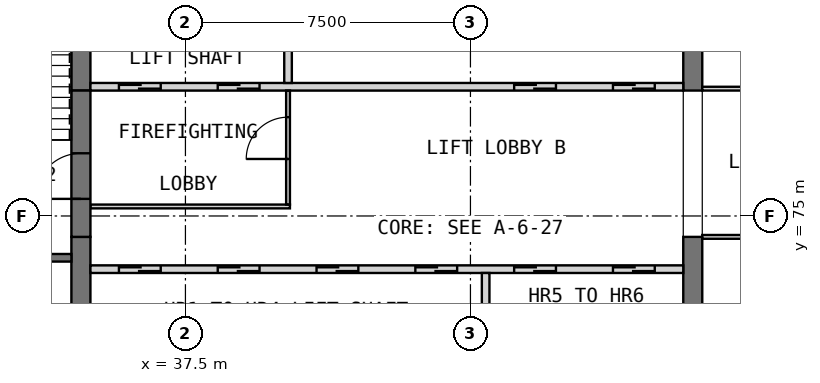
"""IFC4 building model, lengths in metres.
Left out: names, types, materials, properties, quantities, classifications, styles, units other than length and angle.
Written with IfcOpenShell. Run it as: python <this file> out.ifc"""

import sys

from ifc_helpers import new_model, si_unit, direction, frame, frame_2d, origin, place, context, subcontext, project, spatial, rectangle, extrude, element, fill, save


model = new_model("IFC4")
c1 = context("Model", 3, precision=1e-05, world=origin(), true_north=direction((0.0, 1.0)))
c2 = subcontext(c1, "Body", "Model", "MODEL_VIEW")
j1 = project(units=[si_unit("LENGTHUNIT", "METRE"), si_unit("PLANEANGLEUNIT", "RADIAN")], contexts=[c1])
p1 = place(None, origin())
s1 = spatial("IfcSite", under=j1, at=p1, CompositionType="ELEMENT")
p2 = place(p1, origin())
s2 = spatial("IfcBuilding", under=s1, at=p2, CompositionType="ELEMENT")
p3 = place(p2, frame((0.0, 0.0, 189.7)))
s3 = spatial("IfcBuildingStorey", under=s2, at=p3, CompositionType="ELEMENT", Elevation=189.7)
p4 = place(p3, frame((34.75, 68.05, 0.0), z_axis=(0.0, 0.0, 1.0), x_axis=(0.0, 1.0, 0.0)))
e1 = element("IfcWall", 1, at=p4, inside=s3, PredefinedType="SHEAR", context=c2, shape_type="SweptSolid", body=[
    extrude(rectangle(XDim=6.4, YDim=0.5, at=frame_2d((3.2, 0.0))), origin(), (0.0, 0.0, 1.0), 3.5),
])
p5 = place(p3, frame((34.75, 78.3, 0.0), z_axis=(0.0, 0.0, 1.0), x_axis=(0.0, 1.0, 0.0)))
e2 = element("IfcWall", 2, at=p5, inside=s3, PredefinedType="SHEAR", context=c2, shape_type="SweptSolid", body=[
    extrude(rectangle(XDim=3.4, YDim=0.5, at=frame_2d((1.7, 0.0))), origin(), (0.0, 0.0, 1.0), 3.5),
])
p6 = place(p3, frame((50.85, 68.05, 0.0), z_axis=(0.0, 0.0, 1.0), x_axis=(0.0, 1.0, 0.0)))
e3 = element("IfcWall", 3, at=p6, inside=s3, PredefinedType="SHEAR", context=c2, shape_type="SweptSolid", body=[
    extrude(rectangle(XDim=6.4, YDim=0.5, at=frame_2d((3.2, 0.0))), origin(), (0.0, 0.0, 1.0), 3.5),
])
p7 = place(p3, frame((50.85, 78.3, 0.0), z_axis=(0.0, 0.0, 1.0), x_axis=(0.0, 1.0, 0.0)))
e4 = element("IfcWall", 4, at=p7, inside=s3, PredefinedType="SHEAR", context=c2, shape_type="SweptSolid", body=[
    extrude(rectangle(XDim=3.4, YDim=0.5, at=frame_2d((1.7, 0.0))), origin(), (0.0, 0.0, 1.0), 3.5),
])
p8 = place(p3, frame((35.0, 73.6, 0.0), z_axis=(0.0, 0.0, 1.0), x_axis=(1.0, 0.0, 0.0)))
e5 = element("IfcWall", 5, at=p8, inside=s3, PredefinedType="SOLIDWALL", context=c2, shape_type="SweptSolid", body=[
    extrude(rectangle(XDim=15.6, YDim=0.2, at=frame_2d((7.8, 0.0))), origin(), (0.0, 0.0, 1.0), 3.5),
])
p9 = place(p8, frame((0.75, 0.0, 0.0)))
e6 = element("IfcOpeningElement", 6, at=p9, cuts=e5, PredefinedType="OPENING", context=c2, shape_type="SweptSolid", body=[
    extrude(rectangle(XDim=1.1, YDim=2.1, at=frame_2d((0.55, 1.05))), frame((0.0, 0.11, 0.0), z_axis=(0.0, -1.0, 0.0), x_axis=(1.0, 0.0, 0.0)), (0.0, 0.0, 1.0), 0.22),
])
p10 = place(p8, frame((3.35, 0.0, 0.0)))
e7 = element("IfcOpeningElement", 7, at=p10, cuts=e5, PredefinedType="OPENING", context=c2, shape_type="SweptSolid", body=[
    extrude(rectangle(XDim=1.1, YDim=2.1, at=frame_2d((0.55, 1.05))), frame((0.0, 0.11, 0.0), z_axis=(0.0, -1.0, 0.0), x_axis=(1.0, 0.0, 0.0)), (0.0, 0.0, 1.0), 0.22),
])
p11 = place(p8, frame((5.95, 0.0, 0.0)))
e8 = element("IfcOpeningElement", 8, at=p11, cuts=e5, PredefinedType="OPENING", context=c2, shape_type="SweptSolid", body=[
    extrude(rectangle(XDim=1.1, YDim=2.1, at=frame_2d((0.55, 1.05))), frame((0.0, 0.11, 0.0), z_axis=(0.0, -1.0, 0.0), x_axis=(1.0, 0.0, 0.0)), (0.0, 0.0, 1.0), 0.22),
])
p12 = place(p8, frame((8.55, 0.0, 0.0)))
e9 = element("IfcOpeningElement", 9, at=p12, cuts=e5, PredefinedType="OPENING", context=c2, shape_type="SweptSolid", body=[
    extrude(rectangle(XDim=1.1, YDim=2.1, at=frame_2d((0.55, 1.05))), frame((0.0, 0.11, 0.0), z_axis=(0.0, -1.0, 0.0), x_axis=(1.0, 0.0, 0.0)), (0.0, 0.0, 1.0), 0.22),
])
p13 = place(p8, frame((11.15, 0.0, 0.0)))
e10 = element("IfcOpeningElement", 10, at=p13, cuts=e5, PredefinedType="OPENING", context=c2, shape_type="SweptSolid", body=[
    extrude(rectangle(XDim=1.1, YDim=2.1, at=frame_2d((0.55, 1.05))), frame((0.0, 0.11, 0.0), z_axis=(0.0, -1.0, 0.0), x_axis=(1.0, 0.0, 0.0)), (0.0, 0.0, 1.0), 0.22),
])
p14 = place(p8, frame((13.75, 0.0, 0.0)))
e11 = element("IfcOpeningElement", 11, at=p14, cuts=e5, PredefinedType="OPENING", context=c2, shape_type="SweptSolid", body=[
    extrude(rectangle(XDim=1.1, YDim=2.1, at=frame_2d((0.55, 1.05))), frame((0.0, 0.11, 0.0), z_axis=(0.0, -1.0, 0.0), x_axis=(1.0, 0.0, 0.0)), (0.0, 0.0, 1.0), 0.22),
])
p15 = place(p3, frame((45.4, 71.5, 0.0), z_axis=(0.0, 0.0, 1.0), x_axis=(0.0, 1.0, 0.0)))
e12 = element("IfcWall", 12, at=p15, inside=s3, PredefinedType="SOLIDWALL", context=c2, shape_type="SweptSolid", body=[
    extrude(rectangle(XDim=2.0, YDim=0.2, at=frame_2d((1.0, 0.0))), origin(), (0.0, 0.0, 1.0), 3.5),
])
p16 = place(p3, frame((35.0, 78.4, 0.0), z_axis=(0.0, 0.0, 1.0), x_axis=(1.0, 0.0, 0.0)))
e13 = element("IfcWall", 13, at=p16, inside=s3, PredefinedType="SOLIDWALL", context=c2, shape_type="SweptSolid", body=[
    extrude(rectangle(XDim=15.6, YDim=0.2, at=frame_2d((7.8, 0.0))), origin(), (0.0, 0.0, 1.0), 3.5),
])
p17 = place(p16, frame((0.75, 0.0, 0.0)))
e14 = element("IfcOpeningElement", 14, at=p17, cuts=e13, PredefinedType="OPENING", context=c2, shape_type="SweptSolid", body=[
    extrude(rectangle(XDim=1.1, YDim=2.1, at=frame_2d((0.55, 1.05))), frame((0.0, 0.11, 0.0), z_axis=(0.0, -1.0, 0.0), x_axis=(1.0, 0.0, 0.0)), (0.0, 0.0, 1.0), 0.22),
])
p18 = place(p16, frame((3.35, 0.0, 0.0)))
e15 = element("IfcOpeningElement", 15, at=p18, cuts=e13, PredefinedType="OPENING", context=c2, shape_type="SweptSolid", body=[
    extrude(rectangle(XDim=1.1, YDim=2.1, at=frame_2d((0.55, 1.05))), frame((0.0, 0.11, 0.0), z_axis=(0.0, -1.0, 0.0), x_axis=(1.0, 0.0, 0.0)), (0.0, 0.0, 1.0), 0.22),
])
p19 = place(p16, frame((11.15, 0.0, 0.0)))
e16 = element("IfcOpeningElement", 16, at=p19, cuts=e13, PredefinedType="OPENING", context=c2, shape_type="SweptSolid", body=[
    extrude(rectangle(XDim=1.1, YDim=2.1, at=frame_2d((0.55, 1.05))), frame((0.0, 0.11, 0.0), z_axis=(0.0, -1.0, 0.0), x_axis=(1.0, 0.0, 0.0)), (0.0, 0.0, 1.0), 0.22),
])
p20 = place(p16, frame((13.75, 0.0, 0.0)))
e17 = element("IfcOpeningElement", 17, at=p20, cuts=e13, PredefinedType="OPENING", context=c2, shape_type="SweptSolid", body=[
    extrude(rectangle(XDim=1.1, YDim=2.1, at=frame_2d((0.55, 1.05))), frame((0.0, 0.11, 0.0), z_axis=(0.0, -1.0, 0.0), x_axis=(1.0, 0.0, 0.0)), (0.0, 0.0, 1.0), 0.22),
])
p21 = place(p3, frame((40.2, 78.5, 0.0), z_axis=(0.0, 0.0, 1.0), x_axis=(0.0, 1.0, 0.0)))
e18 = element("IfcWall", 18, at=p21, inside=s3, PredefinedType="SOLIDWALL", context=c2, shape_type="SweptSolid", body=[
    extrude(rectangle(XDim=3.2, YDim=0.2, at=frame_2d((1.6, 0.0))), origin(), (0.0, 0.0, 1.0), 3.5),
])
p22 = place(p3, frame((35.0, 75.25, 0.0), z_axis=(0.0, 0.0, 1.0), x_axis=(1.0, 0.0, 0.0)))
e19 = element("IfcWall", 19, at=p22, inside=s3, PredefinedType="PARTITIONING", context=c2, shape_type="SweptSolid", body=[
    extrude(rectangle(XDim=5.25, YDim=0.1, at=frame_2d((2.625, 0.0))), origin(), (0.0, 0.0, 1.0), 3.25),
])
p23 = place(p3, frame((40.2, 75.3, 0.0), z_axis=(0.0, 0.0, 1.0), x_axis=(0.0, 1.0, 0.0)))
e20 = element("IfcWall", 20, at=p23, inside=s3, PredefinedType="PARTITIONING", context=c2, shape_type="SweptSolid", body=[
    extrude(rectangle(XDim=3.0, YDim=0.1, at=frame_2d((1.5, 0.0))), origin(), (0.0, 0.0, 1.0), 3.25),
])
p24 = place(p23, frame((1.2, 0.0, 0.0)))
e21 = element("IfcOpeningElement", 21, at=p24, cuts=e20, PredefinedType="OPENING", context=c2, shape_type="SweptSolid", body=[
    extrude(rectangle(XDim=1.1, YDim=2.1, at=frame_2d((0.55, 1.05))), frame((0.0, 0.06, 0.0), z_axis=(0.0, -1.0, 0.0), x_axis=(1.0, 0.0, 0.0)), (0.0, 0.0, 1.0), 0.12),
])
p25 = place(p3, frame((34.75, 74.45, 0.0), z_axis=(0.0, 0.0, 1.0), x_axis=(0.0, 1.0, 0.0)))
e22 = element("IfcWall", 22, at=p25, inside=s3, PredefinedType="SOLIDWALL", context=c2, shape_type="SweptSolid", body=[
    extrude(rectangle(XDim=3.85, YDim=0.5, at=frame_2d((1.925, 0.0))), origin(), (0.0, 0.0, 1.0), 2.3),
])
p26 = place(p25, frame((1.0, 0.0, 0.0)))
e23 = element("IfcOpeningElement", 23, at=p26, cuts=e22, PredefinedType="OPENING", context=c2, shape_type="SweptSolid", body=[
    extrude(rectangle(XDim=1.2, YDim=2.1, at=frame_2d((0.6, 1.05))), frame((0.0, 0.26, 0.0), z_axis=(0.0, -1.0, 0.0), x_axis=(1.0, 0.0, 0.0)), (0.0, 0.0, 1.0), 0.52),
])
p27 = place(p3, frame((30.8, 73.9, 0.0), z_axis=(0.0, 0.0, 1.0), x_axis=(1.0, 0.0, 0.0)))
e24 = element("IfcWall", 24, at=p27, inside=s3, PredefinedType="SOLIDWALL", context=c2, shape_type="SweptSolid", body=[
    extrude(rectangle(XDim=3.7, YDim=0.2, at=frame_2d((1.85, 0.0))), origin(), (0.0, 0.0, 1.0), 3.25),
])
p28 = place(p27, frame((1.5, 0.0, 0.0)))
e25 = element("IfcOpeningElement", 25, at=p28, cuts=e24, PredefinedType="OPENING", context=c2, shape_type="SweptSolid", body=[
    extrude(rectangle(XDim=0.9, YDim=2.1, at=frame_2d((0.45, 1.05))), frame((0.0, 0.11, 0.0), z_axis=(0.0, -1.0, 0.0), x_axis=(1.0, 0.0, 0.0)), (0.0, 0.0, 1.0), 0.22),
])
p29 = place(p3, frame((51.1, 74.45, 0.0), z_axis=(0.0, 0.0, 1.0), x_axis=(1.0, 0.0, 0.0)))
e26 = element("IfcWall", 26, at=p29, inside=s3, PredefinedType="PARTITIONING", context=c2, shape_type="SweptSolid", body=[
    extrude(rectangle(XDim=8.1, YDim=0.1, at=frame_2d((4.05, 0.0))), origin(), (0.0, 0.0, 1.0), 3.25),
])
p30 = place(p29, frame((3.6, 0.0, 0.0)))
e27 = element("IfcOpeningElement", 27, at=p30, cuts=e26, PredefinedType="OPENING", context=c2, shape_type="SweptSolid", body=[
    extrude(rectangle(XDim=0.9, YDim=2.1, at=frame_2d((0.45, 1.05))), frame((0.0, 0.06, 0.0), z_axis=(0.0, -1.0, 0.0), x_axis=(1.0, 0.0, 0.0)), (0.0, 0.0, 1.0), 0.12),
])
p31 = place(p3, frame((51.1, 78.35, 0.0), z_axis=(0.0, 0.0, 1.0), x_axis=(1.0, 0.0, 0.0)))
e28 = element("IfcWall", 28, at=p31, inside=s3, PredefinedType="PARTITIONING", context=c2, shape_type="SweptSolid", body=[
    extrude(rectangle(XDim=8.1, YDim=0.1, at=frame_2d((4.05, 0.0))), origin(), (0.0, 0.0, 1.0), 3.25),
])
p32 = place(p31, frame((3.6, 0.0, 0.0)))
e29 = element("IfcOpeningElement", 29, at=p32, cuts=e28, PredefinedType="OPENING", context=c2, shape_type="SweptSolid", body=[
    extrude(rectangle(XDim=0.9, YDim=2.1, at=frame_2d((0.45, 1.05))), frame((0.0, 0.06, 0.0), z_axis=(0.0, -1.0, 0.0), x_axis=(1.0, 0.0, 0.0)), (0.0, 0.0, 1.0), 0.12),
])
p33 = place(p9, origin())
e30 = element("IfcDoor", 30, at=p33, inside=s3, OperationType="DOUBLE_DOOR_SLIDING", PredefinedType="DOOR", context=c2, shape_type="SweptSolid", body=[
    extrude(rectangle(XDim=1.1, YDim=2.1, at=frame_2d((0.55, 1.05))), frame((0.0, 0.025, 0.0), z_axis=(0.0, -1.0, 0.0), x_axis=(1.0, 0.0, 0.0)), (0.0, 0.0, 1.0), 0.05),
])
fill(e6, e30)
p34 = place(p10, origin())
e31 = element("IfcDoor", 31, at=p34, inside=s3, OperationType="DOUBLE_DOOR_SLIDING", PredefinedType="DOOR", context=c2, shape_type="SweptSolid", body=[
    extrude(rectangle(XDim=1.1, YDim=2.1, at=frame_2d((0.55, 1.05))), frame((0.0, 0.025, 0.0), z_axis=(0.0, -1.0, 0.0), x_axis=(1.0, 0.0, 0.0)), (0.0, 0.0, 1.0), 0.05),
])
fill(e7, e31)
p35 = place(p11, origin())
e32 = element("IfcDoor", 32, at=p35, inside=s3, OperationType="DOUBLE_DOOR_SLIDING", PredefinedType="DOOR", context=c2, shape_type="SweptSolid", body=[
    extrude(rectangle(XDim=1.1, YDim=2.1, at=frame_2d((0.55, 1.05))), frame((0.0, 0.025, 0.0), z_axis=(0.0, -1.0, 0.0), x_axis=(1.0, 0.0, 0.0)), (0.0, 0.0, 1.0), 0.05),
])
fill(e8, e32)
p36 = place(p12, origin())
e33 = element("IfcDoor", 33, at=p36, inside=s3, OperationType="DOUBLE_DOOR_SLIDING", PredefinedType="DOOR", context=c2, shape_type="SweptSolid", body=[
    extrude(rectangle(XDim=1.1, YDim=2.1, at=frame_2d((0.55, 1.05))), frame((0.0, 0.025, 0.0), z_axis=(0.0, -1.0, 0.0), x_axis=(1.0, 0.0, 0.0)), (0.0, 0.0, 1.0), 0.05),
])
fill(e9, e33)
p37 = place(p13, origin())
e34 = element("IfcDoor", 34, at=p37, inside=s3, OperationType="DOUBLE_DOOR_SLIDING", PredefinedType="DOOR", context=c2, shape_type="SweptSolid", body=[
    extrude(rectangle(XDim=1.1, YDim=2.1, at=frame_2d((0.55, 1.05))), frame((0.0, 0.025, 0.0), z_axis=(0.0, -1.0, 0.0), x_axis=(1.0, 0.0, 0.0)), (0.0, 0.0, 1.0), 0.05),
])
fill(e10, e34)
p38 = place(p14, origin())
e35 = element("IfcDoor", 35, at=p38, inside=s3, OperationType="DOUBLE_DOOR_SLIDING", PredefinedType="DOOR", context=c2, shape_type="SweptSolid", body=[
    extrude(rectangle(XDim=1.1, YDim=2.1, at=frame_2d((0.55, 1.05))), frame((0.0, 0.025, 0.0), z_axis=(0.0, -1.0, 0.0), x_axis=(1.0, 0.0, 0.0)), (0.0, 0.0, 1.0), 0.05),
])
fill(e11, e35)
p39 = place(p17, origin())
e36 = element("IfcDoor", 36, at=p39, inside=s3, OperationType="DOUBLE_DOOR_SLIDING", PredefinedType="DOOR", context=c2, shape_type="SweptSolid", body=[
    extrude(rectangle(XDim=1.1, YDim=2.1, at=frame_2d((0.55, 1.05))), frame((0.0, 0.025, 0.0), z_axis=(0.0, -1.0, 0.0), x_axis=(1.0, 0.0, 0.0)), (0.0, 0.0, 1.0), 0.05),
])
fill(e14, e36)
p40 = place(p18, origin())
e37 = element("IfcDoor", 37, at=p40, inside=s3, OperationType="DOUBLE_DOOR_SLIDING", PredefinedType="DOOR", context=c2, shape_type="SweptSolid", body=[
    extrude(rectangle(XDim=1.1, YDim=2.1, at=frame_2d((0.55, 1.05))), frame((0.0, 0.025, 0.0), z_axis=(0.0, -1.0, 0.0), x_axis=(1.0, 0.0, 0.0)), (0.0, 0.0, 1.0), 0.05),
])
fill(e15, e37)
p41 = place(p19, origin())
e38 = element("IfcDoor", 38, at=p41, inside=s3, OperationType="DOUBLE_DOOR_SLIDING", PredefinedType="DOOR", context=c2, shape_type="SweptSolid", body=[
    extrude(rectangle(XDim=1.1, YDim=2.1, at=frame_2d((0.55, 1.05))), frame((0.0, 0.025, 0.0), z_axis=(0.0, -1.0, 0.0), x_axis=(1.0, 0.0, 0.0)), (0.0, 0.0, 1.0), 0.05),
])
fill(e16, e38)
p42 = place(p20, origin())
e39 = element("IfcDoor", 39, at=p42, inside=s3, OperationType="DOUBLE_DOOR_SLIDING", PredefinedType="DOOR", context=c2, shape_type="SweptSolid", body=[
    extrude(rectangle(XDim=1.1, YDim=2.1, at=frame_2d((0.55, 1.05))), frame((0.0, 0.025, 0.0), z_axis=(0.0, -1.0, 0.0), x_axis=(1.0, 0.0, 0.0)), (0.0, 0.0, 1.0), 0.05),
])
fill(e17, e39)
p43 = place(p24, origin())
e40 = element("IfcDoor", 40, at=p43, inside=s3, OperationType="SINGLE_SWING_LEFT", PredefinedType="DOOR", context=c2, shape_type="SweptSolid", body=[
    extrude(rectangle(XDim=1.1, YDim=2.1, at=frame_2d((0.55, 1.05))), frame((0.0, 0.025, 0.0), z_axis=(0.0, -1.0, 0.0), x_axis=(1.0, 0.0, 0.0)), (0.0, 0.0, 1.0), 0.05),
])
fill(e21, e40)
p44 = place(p26, origin())
e41 = element("IfcDoor", 41, at=p44, inside=s3, OperationType="SINGLE_SWING_RIGHT", PredefinedType="DOOR", context=c2, shape_type="SweptSolid", body=[
    extrude(rectangle(XDim=1.2, YDim=2.1, at=frame_2d((0.6, 1.05))), frame((0.0, 0.025, 0.0), z_axis=(0.0, -1.0, 0.0), x_axis=(1.0, 0.0, 0.0)), (0.0, 0.0, 1.0), 0.05),
])
fill(e23, e41)
save(model, sys.argv[1])
